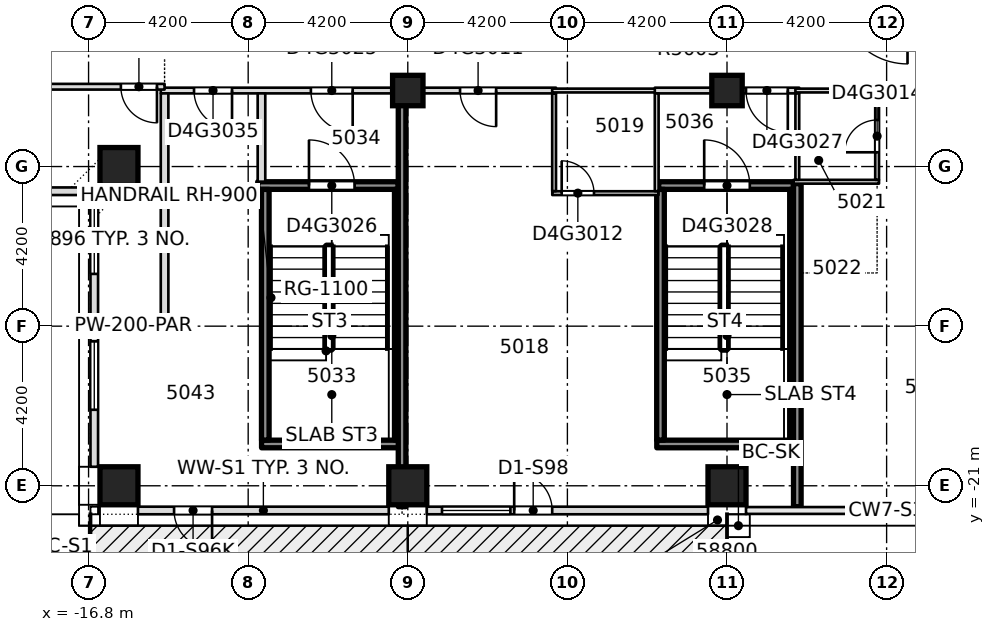
"""IFC4 building model, lengths in metres.
Left out: names, types, materials, properties, quantities, classifications, styles, units other than length and angle.
Written with IfcOpenShell. Run it as: python <this file> out.ifc"""

import sys

from ifc_helpers import new_model, si_unit, direction, frame, frame_2d, origin, origin_2d, place, context, subcontext, project, spatial, rectangle, extrude, element, fill, save


model = new_model("IFC4")
c1 = context("Model", 3, precision=1e-05, world=origin(), true_north=direction((0.0, 1.0)))
c2 = subcontext(c1, "Body", "Model", "MODEL_VIEW")
j1 = project(units=[si_unit("LENGTHUNIT", "METRE"), si_unit("PLANEANGLEUNIT", "RADIAN")], contexts=[c1])
p1 = place(None, origin())
s1 = spatial("IfcSite", under=j1, at=p1, CompositionType="ELEMENT")
p2 = place(p1, origin())
s2 = spatial("IfcBuilding", under=s1, at=p2, CompositionType="ELEMENT")
p3 = place(p2, frame((0.0, 0.0, 192.8)))
s3 = spatial("IfcBuildingStorey", under=s2, at=p3, CompositionType="ELEMENT", Elevation=192.8)
for number, where, z_axis, x_axis in (
    (1, (-16.0, -21.0, -0.4), (0.0, 0.0, 1.0), (1.0, 0.0, 0.0)),
    (2, (-8.4, -21.0, -0.4), (0.0, 0.0, 1.0), (1.0, 0.0, 0.0)),
    (3, (0.0, -21.0, -0.4), (0.0, 0.0, 1.0), (1.0, 0.0, 0.0)),
    (4, (-16.0, -12.6, -0.4), (0.0, 0.0, 1.0), (1.0, 0.0, 0.0)),
):
    element("IfcColumn", number, at=place(p3, frame(where, z_axis=z_axis, x_axis=x_axis)), inside=s3, PredefinedType="COLUMN", context=c2, shape_type="SweptSolid", body=[
        extrude(rectangle(XDim=1.0, YDim=1.0, at=origin_2d()), origin(), (0.0, 0.0, 1.0), 3.45),
    ])
for number, where, z_axis, x_axis in (
    (5, (-8.4, -10.6, -0.4), (0.0, 0.0, 1.0), (1.0, 0.0, 0.0)),
    (6, (0.0, -10.6, -0.4), (0.0, 0.0, 1.0), (1.0, 0.0, 0.0)),
):
    element("IfcColumn", number, at=place(p3, frame(where, z_axis=z_axis, x_axis=x_axis)), inside=s3, PredefinedType="COLUMN", context=c2, shape_type="SweptSolid", body=[
        extrude(rectangle(XDim=0.8, YDim=0.8, at=origin_2d()), origin(), (0.0, 0.0, 1.0), 3.45),
    ])
p4 = place(p3, frame((-12.248, -19.9, 0.0), z_axis=(0.0, 0.0, 1.0), x_axis=(1.0, 0.0, 0.0)))
e7 = element("IfcWall", 7, at=p4, inside=s3, PredefinedType="SOLIDWALL", context=c2, shape_type="SweptSolid", body=[
    extrude(rectangle(XDim=3.696, YDim=0.2, at=frame_2d((1.848, 0.0))), origin(), (0.0, 0.0, 1.0), 3.05),
])
p5 = place(p3, frame((-1.848, -19.9, 0.0), z_axis=(0.0, 0.0, 1.0), x_axis=(1.0, 0.0, 0.0)))
e8 = element("IfcWall", 8, at=p5, inside=s3, PredefinedType="SOLIDWALL", context=c2, shape_type="SweptSolid", body=[
    extrude(rectangle(XDim=3.696, YDim=0.2, at=frame_2d((1.848, 0.0))), origin(), (0.0, 0.0, 1.0), 3.05),
])
p6 = place(p3, frame((-16.55, -16.8, 0.0), z_axis=(0.0, 0.0, 1.0), x_axis=(1.0, 0.0, 0.0)))
e9 = element("IfcWall", 9, at=p6, inside=s3, PredefinedType="PARTITIONING", context=c2, shape_type="SweptSolid", body=[
    extrude(rectangle(XDim=1.848, YDim=0.2, at=frame_2d((0.924, 0.0))), origin(), (0.0, 0.0, 1.0), 3.05),
])
p7 = place(p3, frame((-4.598, -13.3, 0.0), z_axis=(0.0, 0.0, 1.0), x_axis=(1.0, 0.0, 0.0)))
e10 = element("IfcWall", 10, at=p7, inside=s3, PredefinedType="PARTITIONING", context=c2, shape_type="SweptSolid", body=[
    extrude(rectangle(XDim=2.796, YDim=0.1, at=frame_2d((1.398, 0.0))), origin(), (0.0, 0.0, 1.0), 3.05),
])
p8 = place(p7, frame((0.248, 0.0, 0.0)))
e11 = element("IfcOpeningElement", 11, at=p8, cuts=e10, PredefinedType="OPENING", context=c2, shape_type="SweptSolid", body=[
    extrude(rectangle(XDim=0.85, YDim=2.1, at=frame_2d((0.425, 1.05))), frame((0.0, 0.06, 0.0), z_axis=(0.0, -1.0, 0.0), x_axis=(1.0, 0.0, 0.0)), (0.0, 0.0, 1.0), 0.12),
])
p9 = place(p3, frame((-12.348, -13.1, 0.0), z_axis=(0.0, 0.0, 1.0), x_axis=(1.0, 0.0, 0.0)))
e12 = element("IfcWall", 12, at=p9, inside=s3, PredefinedType="SOLIDWALL", context=c2, shape_type="SweptSolid", body=[
    extrude(rectangle(XDim=3.696, YDim=0.2, at=frame_2d((1.848, 0.0))), origin(), (0.0, 0.0, 1.0), 3.05),
])
p10 = place(p9, frame((1.348, 0.0, 0.0)))
e13 = element("IfcOpeningElement", 13, at=p10, cuts=e12, PredefinedType="OPENING", context=c2, shape_type="SweptSolid", body=[
    extrude(rectangle(XDim=1.2, YDim=2.1, at=frame_2d((0.6, 1.05))), frame((0.0, 0.11, 0.0), z_axis=(0.0, -1.0, 0.0), x_axis=(1.0, 0.0, 0.0)), (0.0, 0.0, 1.0), 0.22),
])
p11 = place(p3, frame((-1.798, -13.1, 0.0), z_axis=(0.0, 0.0, 1.0), x_axis=(1.0, 0.0, 0.0)))
e14 = element("IfcWall", 14, at=p11, inside=s3, PredefinedType="SOLIDWALL", context=c2, shape_type="SweptSolid", body=[
    extrude(rectangle(XDim=3.546, YDim=0.2, at=frame_2d((1.773, 0.0))), origin(), (0.0, 0.0, 1.0), 3.05),
])
p12 = place(p11, frame((1.198, 0.0, 0.0)))
e15 = element("IfcOpeningElement", 15, at=p12, cuts=e14, PredefinedType="OPENING", context=c2, shape_type="SweptSolid", body=[
    extrude(rectangle(XDim=1.2, YDim=2.1, at=frame_2d((0.6, 1.05))), frame((0.0, 0.11, 0.0), z_axis=(0.0, -1.0, 0.0), x_axis=(1.0, 0.0, 0.0)), (0.0, 0.0, 1.0), 0.22),
])
p13 = place(p3, frame((1.75, -13.0, 0.0), z_axis=(0.0, 0.0, 1.0), x_axis=(1.0, 0.0, 0.0)))
e16 = element("IfcWall", 16, at=p13, inside=s3, PredefinedType="PARTITIONING", context=c2, shape_type="SweptSolid", body=[
    extrude(rectangle(XDim=2.25, YDim=0.1, at=frame_2d((1.125, 0.0))), origin(), (0.0, 0.0, 1.0), 3.05),
])
p14 = place(p3, frame((-14.9, -10.6, 0.0), z_axis=(0.0, 0.0, 1.0), x_axis=(1.0, 0.0, 0.0)))
e17 = element("IfcWall", 17, at=p14, inside=s3, PredefinedType="PARTITIONING", context=c2, shape_type="SweptSolid", body=[
    extrude(rectangle(XDim=10.4, YDim=0.15, at=frame_2d((5.2, 0.0))), origin(), (0.0, 0.0, 1.0), 3.05),
])
p15 = place(p14, frame((7.875, 0.0, 0.0)))
e18 = element("IfcOpeningElement", 18, at=p15, cuts=e17, PredefinedType="OPENING", context=c2, shape_type="SweptSolid", body=[
    extrude(rectangle(XDim=0.95, YDim=2.1, at=frame_2d((0.475, 1.05))), frame((0.0, 0.085, 0.0), z_axis=(0.0, -1.0, 0.0), x_axis=(1.0, 0.0, 0.0)), (0.0, 0.0, 1.0), 0.17),
])
p16 = place(p14, frame((3.95, 0.0, 0.0)))
e19 = element("IfcOpeningElement", 19, at=p16, cuts=e17, PredefinedType="OPENING", context=c2, shape_type="SweptSolid", body=[
    extrude(rectangle(XDim=1.1, YDim=2.1, at=frame_2d((0.55, 1.05))), frame((0.0, 0.085, 0.0), z_axis=(0.0, -1.0, 0.0), x_axis=(1.0, 0.0, 0.0)), (0.0, 0.0, 1.0), 0.17),
])
p17 = place(p14, frame((0.875, 0.0, 0.0)))
e20 = element("IfcOpeningElement", 20, at=p17, cuts=e17, PredefinedType="OPENING", context=c2, shape_type="SweptSolid", body=[
    extrude(rectangle(XDim=1.0, YDim=2.1, at=frame_2d((0.5, 1.05))), frame((0.0, 0.085, 0.0), z_axis=(0.0, -1.0, 0.0), x_axis=(1.0, 0.0, 0.0)), (0.0, 0.0, 1.0), 0.17),
])
p18 = place(p3, frame((-4.6, -10.6, 0.0), z_axis=(0.0, 0.0, 1.0), x_axis=(1.0, 0.0, 0.0)))
e21 = element("IfcWall", 21, at=p18, inside=s3, PredefinedType="PARTITIONING", context=c2, shape_type="SweptSolid", body=[
    extrude(rectangle(XDim=2.8, YDim=0.1, at=frame_2d((1.4, 0.0))), origin(), (0.0, 0.0, 1.0), 3.05),
])
p19 = place(p3, frame((-1.9, -10.6, 0.0), z_axis=(0.0, 0.0, 1.0), x_axis=(1.0, 0.0, 0.0)))
e22 = element("IfcWall", 22, at=p19, inside=s3, PredefinedType="PARTITIONING", context=c2, shape_type="SweptSolid", body=[
    extrude(rectangle(XDim=3.8, YDim=0.15, at=frame_2d((1.9, 0.0))), origin(), (0.0, 0.0, 1.0), 3.05),
])
p20 = place(p19, frame((2.4, 0.0, 0.0)))
e23 = element("IfcOpeningElement", 23, at=p20, cuts=e22, PredefinedType="OPENING", context=c2, shape_type="SweptSolid", body=[
    extrude(rectangle(XDim=1.1, YDim=2.1, at=frame_2d((0.55, 1.05))), frame((0.0, 0.085, 0.0), z_axis=(0.0, -1.0, 0.0), x_axis=(1.0, 0.0, 0.0)), (0.0, 0.0, 1.0), 0.17),
])
p21 = place(p3, frame((1.8, -10.6, 0.0), z_axis=(0.0, 0.0, 1.0), x_axis=(1.0, 0.0, 0.0)))
e24 = element("IfcWall", 24, at=p21, inside=s3, PredefinedType="PARTITIONING", context=c2, shape_type="SweptSolid", body=[
    extrude(rectangle(XDim=2.2, YDim=0.1, at=frame_2d((1.1, 0.0))), origin(), (0.0, 0.0, 1.0), 3.05),
])
p22 = place(p3, frame((3.9, -10.6, 0.0), z_axis=(0.0, 0.0, 1.0), x_axis=(1.0, 0.0, 0.0)))
e25 = element("IfcWall", 25, at=p22, inside=s3, PredefinedType="PARTITIONING", context=c2, shape_type="SweptSolid", body=[
    extrude(rectangle(XDim=11.0, YDim=0.15, at=frame_2d((5.5, 0.0))), origin(), (0.0, 0.0, 1.0), 3.05),
])
p23 = place(p22, frame((1.875, 0.0, 0.0)))
e26 = element("IfcOpeningElement", 26, at=p23, cuts=e25, PredefinedType="OPENING", context=c2, shape_type="SweptSolid", body=[
    extrude(rectangle(XDim=0.95, YDim=2.1, at=frame_2d((0.475, 1.05))), frame((0.0, 0.085, 0.0), z_axis=(0.0, -1.0, 0.0), x_axis=(1.0, 0.0, 0.0)), (0.0, 0.0, 1.0), 0.17),
])
p24 = place(p22, frame((5.95, 0.0, 0.0)))
e27 = element("IfcOpeningElement", 27, at=p24, cuts=e25, PredefinedType="OPENING", context=c2, shape_type="SweptSolid", body=[
    extrude(rectangle(XDim=1.1, YDim=2.1, at=frame_2d((0.55, 1.05))), frame((0.0, 0.085, 0.0), z_axis=(0.0, -1.0, 0.0), x_axis=(1.0, 0.0, 0.0)), (0.0, 0.0, 1.0), 0.17),
])
p25 = place(p22, frame((9.125, 0.0, 0.0)))
e28 = element("IfcOpeningElement", 28, at=p25, cuts=e25, PredefinedType="OPENING", context=c2, shape_type="SweptSolid", body=[
    extrude(rectangle(XDim=1.0, YDim=2.1, at=frame_2d((0.5, 1.05))), frame((0.0, 0.085, 0.0), z_axis=(0.0, -1.0, 0.0), x_axis=(1.0, 0.0, 0.0)), (0.0, 0.0, 1.0), 0.17),
])
p26 = place(p3, frame((-25.75, -10.5, 0.0), z_axis=(0.0, 0.0, 1.0), x_axis=(1.0, 0.0, 0.0)))
e29 = element("IfcWall", 29, at=p26, inside=s3, PredefinedType="PARTITIONING", context=c2, shape_type="SweptSolid", body=[
    extrude(rectangle(XDim=10.95, YDim=0.15, at=frame_2d((5.475, 0.0))), origin(), (0.0, 0.0, 1.0), 3.05),
])
p27 = place(p26, frame((9.8, 0.0, 0.0)))
e30 = element("IfcOpeningElement", 30, at=p27, cuts=e29, PredefinedType="OPENING", context=c2, shape_type="SweptSolid", body=[
    extrude(rectangle(XDim=0.95, YDim=2.1, at=frame_2d((0.475, 1.05))), frame((0.0, 0.085, 0.0), z_axis=(0.0, -1.0, 0.0), x_axis=(1.0, 0.0, 0.0)), (0.0, 0.0, 1.0), 0.17),
])
p28 = place(p3, frame((-14.8, -16.698, 0.0), z_axis=(0.0, 0.0, 1.0), x_axis=(0.0, 1.0, 0.0)))
e31 = element("IfcWall", 31, at=p28, inside=s3, PredefinedType="PARTITIONING", context=c2, shape_type="SweptSolid", body=[
    extrude(rectangle(XDim=6.023, YDim=0.2, at=frame_2d((3.011, 0.0))), origin(), (0.0, 0.0, 1.0), 3.05),
])
p29 = place(p3, frame((-12.25, -12.998, 0.0), z_axis=(0.0, 0.0, 1.0), x_axis=(0.0, 1.0, 0.0)))
e32 = element("IfcWall", 32, at=p29, inside=s3, PredefinedType="PARTITIONING", context=c2, shape_type="SweptSolid", body=[
    extrude(rectangle(XDim=2.323, YDim=0.2, at=frame_2d((1.162, 0.0))), origin(), (0.0, 0.0, 1.0), 3.05),
])
for number, where, z_axis, x_axis in (
    (33, (-12.15, -19.798, 0.0), (0.0, 0.0, 1.0), (0.0, 1.0, 0.0)),
    (34, (-8.65, -19.798, 0.0), (0.0, 0.0, 1.0), (0.0, 1.0, 0.0)),
):
    element("IfcWall", number, at=place(p3, frame(where, z_axis=z_axis, x_axis=x_axis)), inside=s3, PredefinedType="SOLIDWALL", context=c2, shape_type="SweptSolid", body=[
        extrude(rectangle(XDim=6.596, YDim=0.2, at=frame_2d((3.298, 0.0))), origin(), (0.0, 0.0, 1.0), 3.05),
    ])
for number, where, z_axis, x_axis in (
    (35, (-4.55, -13.248, 0.0), (0.0, 0.0, 1.0), (0.0, 1.0, 0.0)),
    (36, (-1.85, -13.248, 0.0), (0.0, 0.0, 1.0), (0.0, 1.0, 0.0)),
):
    element("IfcWall", number, at=place(p3, frame(where, z_axis=z_axis, x_axis=x_axis)), inside=s3, PredefinedType="PARTITIONING", context=c2, shape_type="SweptSolid", body=[
        extrude(rectangle(XDim=2.573, YDim=0.1, at=frame_2d((1.287, 0.0))), origin(), (0.0, 0.0, 1.0), 3.05),
    ])
for number, where, z_axis, x_axis in (
    (37, (-1.75, -19.798, 0.0), (0.0, 0.0, 1.0), (0.0, 1.0, 0.0)),
    (38, (1.75, -19.798, 0.0), (0.0, 0.0, 1.0), (0.0, 1.0, 0.0)),
):
    element("IfcWall", number, at=place(p3, frame(where, z_axis=z_axis, x_axis=x_axis)), inside=s3, PredefinedType="SOLIDWALL", context=c2, shape_type="SweptSolid", body=[
        extrude(rectangle(XDim=6.596, YDim=0.2, at=frame_2d((3.298, 0.0))), origin(), (0.0, 0.0, 1.0), 3.05),
    ])
p30 = place(p3, frame((1.85, -12.95, 0.0), z_axis=(0.0, 0.0, 1.0), x_axis=(0.0, 1.0, 0.0)))
e39 = element("IfcWall", 39, at=p30, inside=s3, PredefinedType="PARTITIONING", context=c2, shape_type="SweptSolid", body=[
    extrude(rectangle(XDim=2.275, YDim=0.1, at=frame_2d((1.137, 0.0))), origin(), (0.0, 0.0, 1.0), 3.05),
])
p31 = place(p3, frame((3.95, -12.95, 0.0), z_axis=(0.0, 0.0, 1.0), x_axis=(0.0, 1.0, 0.0)))
e40 = element("IfcWall", 40, at=p31, inside=s3, PredefinedType="PARTITIONING", context=c2, shape_type="SweptSolid", body=[
    extrude(rectangle(XDim=2.275, YDim=0.1, at=frame_2d((1.137, 0.0))), origin(), (0.0, 0.0, 1.0), 3.05),
])
p32 = place(p31, frame((0.725, 0.0, 0.0)))
e41 = element("IfcOpeningElement", 41, at=p32, cuts=e40, PredefinedType="OPENING", context=c2, shape_type="SweptSolid", body=[
    extrude(rectangle(XDim=0.85, YDim=2.1, at=frame_2d((0.425, 1.05))), frame((0.0, 0.06, 0.0), z_axis=(0.0, -1.0, 0.0), x_axis=(1.0, 0.0, 0.0)), (0.0, 0.0, 1.0), 0.12),
])
p33 = place(p3, frame((-15.5, -21.65, 0.0), z_axis=(0.0, 0.0, 1.0), x_axis=(1.0, 0.0, 0.0)))
e42 = element("IfcWall", 42, at=p33, inside=s3, PredefinedType="STANDARD", context=c2, shape_type="SweptSolid", body=[
    extrude(rectangle(XDim=6.6, YDim=0.2, at=frame_2d((3.3, 0.0))), origin(), (0.0, 0.0, 1.0), 3.05),
])
p34 = place(p33, frame((0.95, 0.0, 0.0)))
e43 = element("IfcOpeningElement", 43, at=p34, cuts=e42, PredefinedType="OPENING", context=c2, shape_type="SweptSolid", body=[
    extrude(rectangle(XDim=1.0, YDim=2.4, at=frame_2d((0.5, 1.2))), frame((0.0, 0.11, 0.0), z_axis=(0.0, -1.0, 0.0), x_axis=(1.0, 0.0, 0.0)), (0.0, 0.0, 1.0), 0.22),
])
p35 = place(p3, frame((-7.9, -21.65, 0.0), z_axis=(0.0, 0.0, 1.0), x_axis=(1.0, 0.0, 0.0)))
e44 = element("IfcWall", 44, at=p35, inside=s3, PredefinedType="STANDARD", context=c2, shape_type="SweptSolid", body=[
    extrude(rectangle(XDim=7.4, YDim=0.2, at=frame_2d((3.7, 0.0))), origin(), (0.0, 0.0, 1.0), 3.05),
])
p36 = place(p35, frame((0.4, 0.0, 0.2)))
e45 = element("IfcOpeningElement", 45, at=p36, cuts=e44, PredefinedType="OPENING", context=c2, shape_type="SweptSolid", body=[
    extrude(rectangle(XDim=1.8, YDim=2.65, at=frame_2d((0.9, 1.325))), frame((0.0, 0.11, 0.0), z_axis=(0.0, -1.0, 0.0), x_axis=(1.0, 0.0, 0.0)), (0.0, 0.0, 1.0), 0.22),
])
p37 = place(p35, frame((2.3, 0.0, 0.0)))
e46 = element("IfcOpeningElement", 46, at=p37, cuts=e44, PredefinedType="OPENING", context=c2, shape_type="SweptSolid", body=[
    extrude(rectangle(XDim=1.0, YDim=2.4, at=frame_2d((0.5, 1.2))), frame((0.0, 0.11, 0.0), z_axis=(0.0, -1.0, 0.0), x_axis=(1.0, 0.0, 0.0)), (0.0, 0.0, 1.0), 0.22),
])
p38 = place(p3, frame((-24.7, -13.25, 0.0), z_axis=(0.0, 0.0, 1.0), x_axis=(1.0, 0.0, 0.0)))
e47 = element("IfcWall", 47, at=p38, inside=s3, PredefinedType="STANDARD", context=c2, shape_type="SweptSolid", body=[
    extrude(rectangle(XDim=7.95, YDim=0.2, at=frame_2d((3.975, 0.0))), origin(), (0.0, 0.0, 1.0), 3.05),
])
p39 = place(p3, frame((-16.65, -13.35, 0.0), z_axis=(0.0, 0.0, 1.0), x_axis=(0.0, -1.0, 0.0)))
e48 = element("IfcWall", 48, at=p39, inside=s3, PredefinedType="STANDARD", context=c2, shape_type="SweptSolid", body=[
    extrude(rectangle(XDim=7.15, YDim=0.2, at=frame_2d((3.575, 0.0))), origin(), (0.0, 0.0, 1.0), 3.05),
])
p40 = place(p39, frame((3.85, 0.0, 0.2)))
e49 = element("IfcOpeningElement", 49, at=p40, cuts=e48, PredefinedType="OPENING", context=c2, shape_type="SweptSolid", body=[
    extrude(rectangle(XDim=1.8, YDim=2.65, at=frame_2d((0.9, 1.325))), frame((0.0, 0.11, 0.0), z_axis=(0.0, -1.0, 0.0), x_axis=(1.0, 0.0, 0.0)), (0.0, 0.0, 1.0), 0.22),
])
p41 = place(p39, frame((0.275, 0.0, 0.2)))
e50 = element("IfcOpeningElement", 50, at=p41, cuts=e48, PredefinedType="OPENING", context=c2, shape_type="SweptSolid", body=[
    extrude(rectangle(XDim=1.8, YDim=2.65, at=frame_2d((0.9, 1.325))), frame((0.0, 0.11, 0.0), z_axis=(0.0, -1.0, 0.0), x_axis=(1.0, 0.0, 0.0)), (0.0, 0.0, 1.0), 0.22),
])
p42 = place(p3, frame((1.85, -21.55, 0.0), z_axis=(0.0, 0.0, 1.0), x_axis=(0.0, 1.0, 0.0)))
e51 = element("IfcWall", 51, at=p42, inside=s3, PredefinedType="SOLIDWALL", context=c2, shape_type="SweptSolid", body=[
    extrude(rectangle(XDim=8.5, YDim=0.2, at=frame_2d((4.25, 0.0))), origin(), (0.0, 0.0, 1.0), 3.05),
])
p43 = place(p3, frame((-8.55, -21.55, 0.0), z_axis=(0.0, 0.0, 1.0), x_axis=(0.0, 1.0, 0.0)))
e52 = element("IfcWall", 52, at=p43, inside=s3, PredefinedType="SOLIDWALL", context=c2, shape_type="SweptSolid", body=[
    extrude(rectangle(XDim=10.875, YDim=0.2, at=frame_2d((5.438, 0.0))), origin(), (0.0, 0.0, 1.0), 3.05),
])
p44 = place(p27, origin())
e53 = element("IfcDoor", 53, at=p44, inside=s3, OperationType="SINGLE_SWING_RIGHT", PredefinedType="DOOR", context=c2, shape_type="SweptSolid", body=[
    extrude(rectangle(XDim=0.95, YDim=2.1, at=frame_2d((0.475, 1.05))), frame((0.0, 0.025, 0.0), z_axis=(0.0, -1.0, 0.0), x_axis=(1.0, 0.0, 0.0)), (0.0, 0.0, 1.0), 0.05),
])
fill(e30, e53)
p45 = place(p15, origin())
e54 = element("IfcDoor", 54, at=p45, inside=s3, OperationType="SINGLE_SWING_LEFT", PredefinedType="DOOR", context=c2, shape_type="SweptSolid", body=[
    extrude(rectangle(XDim=0.95, YDim=2.1, at=frame_2d((0.475, 1.05))), frame((0.0, 0.025, 0.0), z_axis=(0.0, -1.0, 0.0), x_axis=(1.0, 0.0, 0.0)), (0.0, 0.0, 1.0), 0.05),
])
fill(e18, e54)
p46 = place(p8, origin())
e55 = element("IfcDoor", 55, at=p46, inside=s3, OperationType="SINGLE_SWING_LEFT", PredefinedType="DOOR", context=c2, shape_type="SweptSolid", body=[
    extrude(rectangle(XDim=0.85, YDim=2.1, at=frame_2d((0.425, 1.05))), frame((0.0, 0.025, 0.0), z_axis=(0.0, -1.0, 0.0), x_axis=(1.0, 0.0, 0.0)), (0.0, 0.0, 1.0), 0.05),
])
fill(e11, e55)
p47 = place(p32, origin())
e56 = element("IfcDoor", 56, at=p47, inside=s3, OperationType="SINGLE_SWING_LEFT", PredefinedType="DOOR", context=c2, shape_type="SweptSolid", body=[
    extrude(rectangle(XDim=0.85, YDim=2.1, at=frame_2d((0.425, 1.05))), frame((0.0, 0.025, 0.0), z_axis=(0.0, -1.0, 0.0), x_axis=(1.0, 0.0, 0.0)), (0.0, 0.0, 1.0), 0.05),
])
fill(e41, e56)
p48 = place(p16, origin())
e57 = element("IfcDoor", 57, at=p48, inside=s3, OperationType="SINGLE_SWING_RIGHT", PredefinedType="DOOR", context=c2, shape_type="SweptSolid", body=[
    extrude(rectangle(XDim=1.1, YDim=2.1, at=frame_2d((0.55, 1.05))), frame((0.0, 0.025, 0.0), z_axis=(0.0, -1.0, 0.0), x_axis=(1.0, 0.0, 0.0)), (0.0, 0.0, 1.0), 0.05),
])
fill(e19, e57)
p49 = place(p10, origin())
e58 = element("IfcDoor", 58, at=p49, inside=s3, OperationType="SINGLE_SWING_RIGHT", PredefinedType="DOOR", context=c2, shape_type="SweptSolid", body=[
    extrude(rectangle(XDim=1.2, YDim=2.1, at=frame_2d((0.6, 1.05))), frame((0.0, 0.025, 0.0), z_axis=(0.0, -1.0, 0.0), x_axis=(1.0, 0.0, 0.0)), (0.0, 0.0, 1.0), 0.05),
])
fill(e13, e58)
p50 = place(p20, origin())
e59 = element("IfcDoor", 59, at=p50, inside=s3, OperationType="SINGLE_SWING_LEFT", PredefinedType="DOOR", context=c2, shape_type="SweptSolid", body=[
    extrude(rectangle(XDim=1.1, YDim=2.1, at=frame_2d((0.55, 1.05))), frame((0.0, 0.025, 0.0), z_axis=(0.0, -1.0, 0.0), x_axis=(1.0, 0.0, 0.0)), (0.0, 0.0, 1.0), 0.05),
])
fill(e23, e59)
p51 = place(p12, origin())
e60 = element("IfcDoor", 60, at=p51, inside=s3, OperationType="SINGLE_SWING_RIGHT", PredefinedType="DOOR", context=c2, shape_type="SweptSolid", body=[
    extrude(rectangle(XDim=1.2, YDim=2.1, at=frame_2d((0.6, 1.05))), frame((0.0, 0.025, 0.0), z_axis=(0.0, -1.0, 0.0), x_axis=(1.0, 0.0, 0.0)), (0.0, 0.0, 1.0), 0.05),
])
fill(e15, e60)
p52 = place(p17, origin())
e61 = element("IfcDoor", 61, at=p52, inside=s3, OperationType="SINGLE_SWING_RIGHT", PredefinedType="DOOR", context=c2, shape_type="SweptSolid", body=[
    extrude(rectangle(XDim=1.0, YDim=2.1, at=frame_2d((0.5, 1.05))), frame((0.0, 0.025, 0.0), z_axis=(0.0, -1.0, 0.0), x_axis=(1.0, 0.0, 0.0)), (0.0, 0.0, 1.0), 0.05),
])
fill(e20, e61)
p53 = place(p36, origin())
e62 = element("IfcWindow", 62, at=p53, inside=s3, PartitioningType="SINGLE_PANEL", PredefinedType="WINDOW", context=c2, shape_type="SweptSolid", body=[
    extrude(rectangle(XDim=1.8, YDim=2.65, at=frame_2d((0.9, 1.325))), frame((0.0, 0.03, 0.0), z_axis=(0.0, -1.0, 0.0), x_axis=(1.0, 0.0, 0.0)), (0.0, 0.0, 1.0), 0.06),
])
fill(e45, e62)
p54 = place(p37, origin())
e63 = element("IfcDoor", 63, at=p54, inside=s3, OperationType="SINGLE_SWING_LEFT", PredefinedType="DOOR", context=c2, shape_type="SweptSolid", body=[
    extrude(rectangle(XDim=1.0, YDim=2.4, at=frame_2d((0.5, 1.2))), frame((0.0, 0.025, 0.0), z_axis=(0.0, -1.0, 0.0), x_axis=(1.0, 0.0, 0.0)), (0.0, 0.0, 1.0), 0.05),
])
fill(e46, e63)
p55 = place(p34, origin())
e64 = element("IfcDoor", 64, at=p55, inside=s3, OperationType="SINGLE_SWING_LEFT", PredefinedType="DOOR", context=c2, shape_type="SweptSolid", body=[
    extrude(rectangle(XDim=1.0, YDim=2.4, at=frame_2d((0.5, 1.2))), frame((0.0, 0.025, 0.0), z_axis=(0.0, -1.0, 0.0), x_axis=(1.0, 0.0, 0.0)), (0.0, 0.0, 1.0), 0.05),
])
fill(e43, e64)
p56 = place(p40, origin())
e65 = element("IfcWindow", 65, at=p56, inside=s3, PartitioningType="SINGLE_PANEL", PredefinedType="WINDOW", context=c2, shape_type="SweptSolid", body=[
    extrude(rectangle(XDim=1.8, YDim=2.65, at=frame_2d((0.9, 1.325))), frame((0.0, 0.03, 0.0), z_axis=(0.0, -1.0, 0.0), x_axis=(1.0, 0.0, 0.0)), (0.0, 0.0, 1.0), 0.06),
])
fill(e49, e65)
p57 = place(p41, origin())
e66 = element("IfcWindow", 66, at=p57, inside=s3, PartitioningType="SINGLE_PANEL", PredefinedType="WINDOW", context=c2, shape_type="SweptSolid", body=[
    extrude(rectangle(XDim=1.8, YDim=2.65, at=frame_2d((0.9, 1.325))), frame((0.0, 0.03, 0.0), z_axis=(0.0, -1.0, 0.0), x_axis=(1.0, 0.0, 0.0)), (0.0, 0.0, 1.0), 0.06),
])
fill(e50, e66)
save(model, sys.argv[1])
